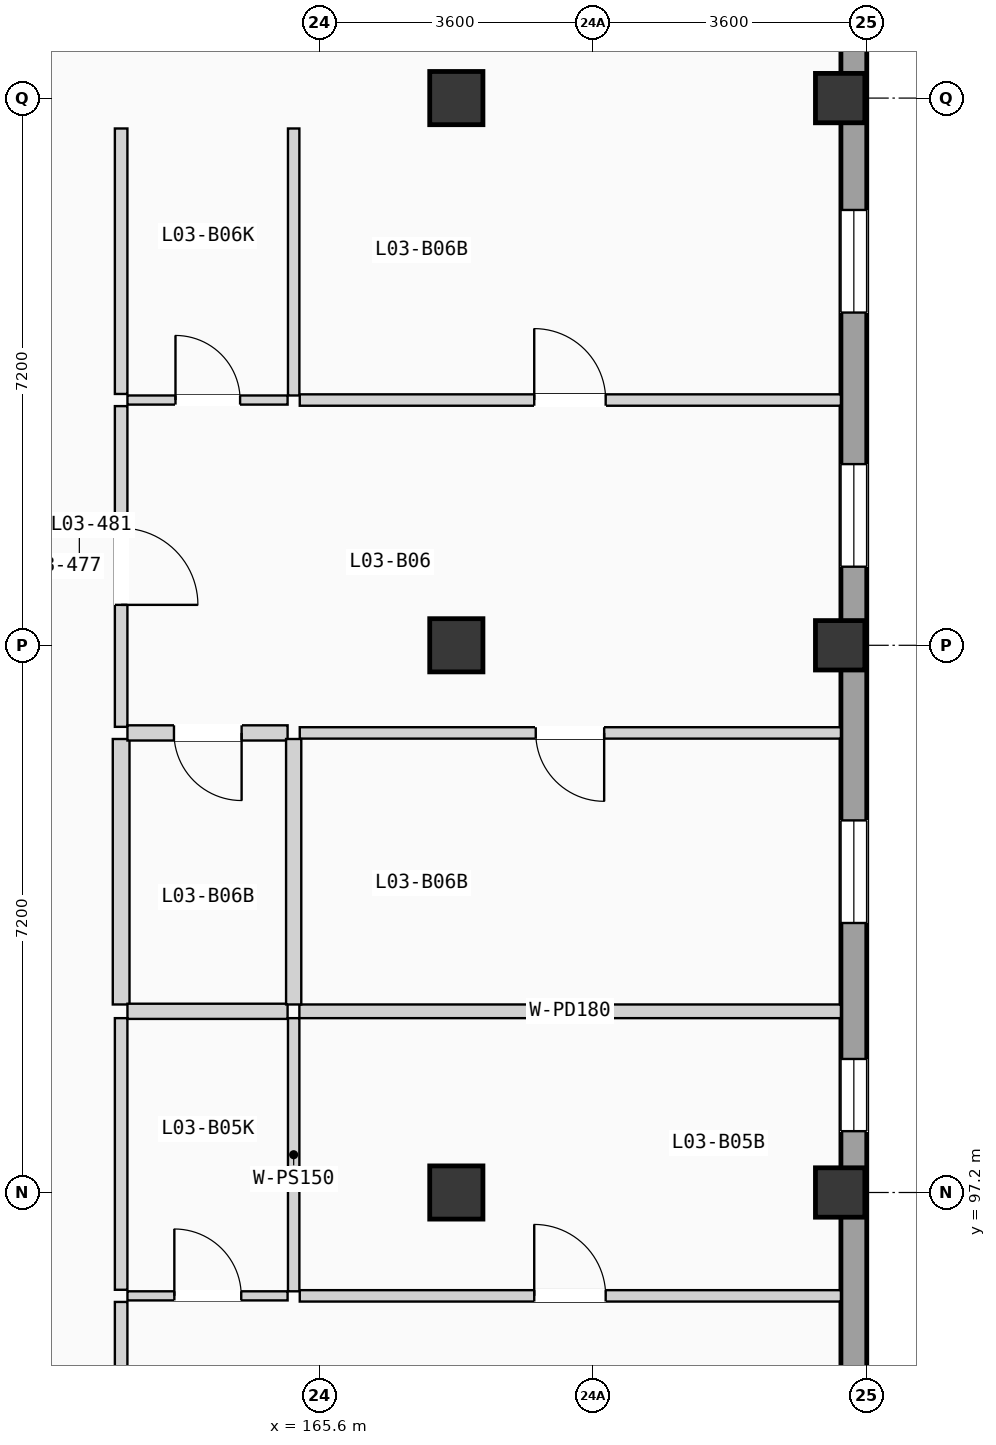
"""IFC4 building model, lengths in metres.
Left out: names, types, materials, properties, quantities, classifications, styles, units other than length and angle.
Written with IfcOpenShell. Run it as: python <this file> out.ifc"""

import sys

from ifc_helpers import new_model, si_unit, direction, frame, frame_2d, origin, origin_2d, place, context, subcontext, project, spatial, rectangle, extrude, element, fill, save


model = new_model("IFC4")
c1 = context("Model", 3, precision=1e-05, world=origin(), true_north=direction((0.0, 1.0)))
c2 = subcontext(c1, "Body", "Model", "MODEL_VIEW")
j1 = project(units=[si_unit("LENGTHUNIT", "METRE"), si_unit("PLANEANGLEUNIT", "RADIAN")], contexts=[c1])
p1 = place(None, origin())
s1 = spatial("IfcSite", under=j1, at=p1, CompositionType="ELEMENT")
p2 = place(p1, origin())
s2 = spatial("IfcBuilding", under=s1, at=p2, CompositionType="ELEMENT")
p3 = place(p2, frame((0.0, 0.0, 12.075)))
s3 = spatial("IfcBuildingStorey", under=s2, at=p3, CompositionType="ELEMENT", Elevation=12.075)
for number, where, z_axis, x_axis in (
    (1, (167.4, 97.2, 0.0), (0.0, 0.0, 1.0), (1.0, 0.0, 0.0)),
    (2, (167.4, 104.4, 0.0), (0.0, 0.0, 1.0), (1.0, 0.0, 0.0)),
    (3, (167.4, 111.6, 0.0), (0.0, 0.0, 1.0), (1.0, 0.0, 0.0)),
):
    element("IfcColumn", number, at=place(p3, frame(where, z_axis=z_axis, x_axis=x_axis)), inside=s3, PredefinedType="COLUMN", context=c2, shape_type="SweptSolid", body=[
        extrude(rectangle(XDim=0.7, YDim=0.7, at=origin_2d()), origin(), (0.0, 0.0, 1.0), 3.15),
    ])
for number, where, z_axis, x_axis in (
    (4, (172.45, 97.2, 0.0), (0.0, 0.0, 1.0), (1.0, 0.0, 0.0)),
    (5, (172.45, 104.4, 0.0), (0.0, 0.0, 1.0), (1.0, 0.0, 0.0)),
    (6, (172.45, 111.6, 0.0), (0.0, 0.0, 1.0), (1.0, 0.0, 0.0)),
):
    element("IfcColumn", number, at=place(p3, frame(where, z_axis=z_axis, x_axis=x_axis)), inside=s3, PredefinedType="COLUMN", context=c2, shape_type="SweptSolid", body=[
        extrude(rectangle(XDim=0.65, YDim=0.65, at=origin_2d()), origin(), (0.0, 0.0, 1.0), 3.15),
    ])
p4 = place(p3, frame((172.63, 68.74, 0.0), z_axis=(0.0, 0.0, 1.0), x_axis=(0.0, 1.0, 0.0)))
e7 = element("IfcWall", 7, at=p4, inside=s3, PredefinedType="SOLIDWALL", context=c2, shape_type="SweptSolid", body=[
    extrude(rectangle(XDim=49.72, YDim=0.34, at=frame_2d((24.86, 0.0))), origin(), (0.0, 0.0, 1.0), 2.89),
])
p5 = place(p4, frame((9.472, 0.0, 0.9)))
e8 = element("IfcOpeningElement", 8, at=p5, cuts=e7, PredefinedType="OPENING", context=c2, shape_type="SweptSolid", body=[
    extrude(rectangle(XDim=1.25, YDim=1.2, at=frame_2d((0.625, 0.6))), frame((0.0, 0.18, 0.0), z_axis=(0.0, -1.0, 0.0), x_axis=(1.0, 0.0, 0.0)), (0.0, 0.0, 1.0), 0.36),
])
p6 = place(p4, frame((15.933, 0.0, 0.855)))
e9 = element("IfcOpeningElement", 9, at=p6, cuts=e7, PredefinedType="OPENING", context=c2, shape_type="SweptSolid", body=[
    extrude(rectangle(XDim=1.25, YDim=1.35, at=frame_2d((0.625, 0.675))), frame((0.0, 0.18, 0.0), z_axis=(0.0, -1.0, 0.0), x_axis=(1.0, 0.0, 0.0)), (0.0, 0.0, 1.0), 0.36),
])
p7 = place(p4, frame((24.235, 0.0, 0.705)))
e10 = element("IfcOpeningElement", 10, at=p7, cuts=e7, PredefinedType="OPENING", context=c2, shape_type="SweptSolid", body=[
    extrude(rectangle(XDim=1.25, YDim=1.5, at=frame_2d((0.625, 0.75))), frame((0.0, 0.18, 0.0), z_axis=(0.0, -1.0, 0.0), x_axis=(1.0, 0.0, 0.0)), (0.0, 0.0, 1.0), 0.36),
])
p8 = place(p4, frame((19.353, 0.0, 0.555)))
e11 = element("IfcOpeningElement", 11, at=p8, cuts=e7, PredefinedType="OPENING", context=c2, shape_type="SweptSolid", body=[
    extrude(rectangle(XDim=1.25, YDim=1.65, at=frame_2d((0.625, 0.825))), frame((0.0, 0.18, 0.0), z_axis=(0.0, -1.0, 0.0), x_axis=(1.0, 0.0, 0.0)), (0.0, 0.0, 1.0), 0.36),
])
p9 = place(p4, frame((29.267, 0.0, 0.85)))
e12 = element("IfcOpeningElement", 12, at=p9, cuts=e7, PredefinedType="OPENING", context=c2, shape_type="SweptSolid", body=[
    extrude(rectangle(XDim=0.95, YDim=1.2, at=frame_2d((0.475, 0.6))), frame((0.0, 0.18, 0.0), z_axis=(0.0, -1.0, 0.0), x_axis=(1.0, 0.0, 0.0)), (0.0, 0.0, 1.0), 0.36),
])
p10 = place(p4, frame((36.694, 0.0, 0.9)))
e13 = element("IfcOpeningElement", 13, at=p10, cuts=e7, PredefinedType="OPENING", context=c2, shape_type="SweptSolid", body=[
    extrude(rectangle(XDim=1.35, YDim=1.2, at=frame_2d((0.675, 0.6))), frame((0.0, 0.18, 0.0), z_axis=(0.0, -1.0, 0.0), x_axis=(1.0, 0.0, 0.0)), (0.0, 0.0, 1.0), 0.36),
])
p11 = place(p4, frame((32.006, 0.0, 0.855)))
e14 = element("IfcOpeningElement", 14, at=p11, cuts=e7, PredefinedType="OPENING", context=c2, shape_type="SweptSolid", body=[
    extrude(rectangle(XDim=1.35, YDim=1.35, at=frame_2d((0.675, 0.675))), frame((0.0, 0.18, 0.0), z_axis=(0.0, -1.0, 0.0), x_axis=(1.0, 0.0, 0.0)), (0.0, 0.0, 1.0), 0.36),
])
p12 = place(p4, frame((40.038, 0.0, 0.705)))
e15 = element("IfcOpeningElement", 15, at=p12, cuts=e7, PredefinedType="OPENING", context=c2, shape_type="SweptSolid", body=[
    extrude(rectangle(XDim=1.35, YDim=1.5, at=frame_2d((0.675, 0.75))), frame((0.0, 0.18, 0.0), z_axis=(0.0, -1.0, 0.0), x_axis=(1.0, 0.0, 0.0)), (0.0, 0.0, 1.0), 0.36),
])
p13 = place(p3, frame((162.99, 91.44, 0.0), z_axis=(0.0, 0.0, 1.0), x_axis=(0.0, 1.0, 0.0)))
e16 = element("IfcWall", 16, at=p13, inside=s3, PredefinedType="PARTITIONING", context=c2, shape_type="SweptSolid", body=[
    extrude(rectangle(XDim=4.32, YDim=0.165, at=frame_2d((2.16, 0.0))), origin(), (0.0, 0.0, 1.0), 2.87),
])
p14 = place(p13, frame((1.655, 0.0, 0.0)))
e17 = element("IfcOpeningElement", 17, at=p14, cuts=e16, PredefinedType="OPENING", context=c2, shape_type="SweptSolid", body=[
    extrude(rectangle(XDim=1.01, YDim=2.11, at=frame_2d((0.505, 1.055))), frame((0.0, 0.093, 0.0), z_axis=(0.0, -1.0, 0.0), x_axis=(1.0, 0.0, 0.0)), (0.0, 0.0, 1.0), 0.185),
])
p15 = place(p3, frame((162.99, 95.92, 0.0), z_axis=(0.0, 0.0, 1.0), x_axis=(0.0, 1.0, 0.0)))
e18 = element("IfcWall", 18, at=p15, inside=s3, PredefinedType="PARTITIONING", context=c2, shape_type="SweptSolid", body=[
    extrude(rectangle(XDim=3.574, YDim=0.165, at=frame_2d((1.787, 0.0))), origin(), (0.0, 0.0, 1.0), 2.87),
])
p16 = place(p3, frame((162.99, 103.327, 0.0), z_axis=(0.0, 0.0, 1.0), x_axis=(0.0, 1.0, 0.0)))
e19 = element("IfcWall", 19, at=p16, inside=s3, PredefinedType="PARTITIONING", context=c2, shape_type="SweptSolid", body=[
    extrude(rectangle(XDim=4.22, YDim=0.165, at=frame_2d((2.11, 0.0))), origin(), (0.0, 0.0, 1.0), 2.87),
])
p17 = place(p16, frame((1.605, 0.0, 0.0)))
e20 = element("IfcOpeningElement", 20, at=p17, cuts=e19, PredefinedType="OPENING", context=c2, shape_type="SweptSolid", body=[
    extrude(rectangle(XDim=1.01, YDim=2.11, at=frame_2d((0.505, 1.055))), frame((0.0, 0.093, 0.0), z_axis=(0.0, -1.0, 0.0), x_axis=(1.0, 0.0, 0.0)), (0.0, 0.0, 1.0), 0.185),
])
p18 = place(p3, frame((162.99, 99.674, 0.0), z_axis=(0.0, 0.0, 1.0), x_axis=(0.0, 1.0, 0.0)))
e21 = element("IfcWall", 21, at=p18, inside=s3, PredefinedType="PLUMBINGWALL", context=c2, shape_type="SweptSolid", body=[
    extrude(rectangle(XDim=3.493, YDim=0.22, at=frame_2d((1.747, 0.0))), origin(), (0.0, 0.0, 1.0), 2.87),
])
p19 = place(p3, frame((162.99, 107.707, 0.0), z_axis=(0.0, 0.0, 1.0), x_axis=(0.0, 1.0, 0.0)))
e22 = element("IfcWall", 22, at=p19, inside=s3, PredefinedType="PARTITIONING", context=c2, shape_type="SweptSolid", body=[
    extrude(rectangle(XDim=3.493, YDim=0.165, at=frame_2d((1.747, 0.0))), origin(), (0.0, 0.0, 1.0), 2.87),
])
p20 = place(p3, frame((163.073, 95.84, 0.0), z_axis=(0.0, 0.0, 1.0), x_axis=(1.0, 0.0, 0.0)))
e23 = element("IfcWall", 23, at=p20, inside=s3, PredefinedType="PARTITIONING", context=c2, shape_type="SweptSolid", body=[
    extrude(rectangle(XDim=2.107, YDim=0.12, at=frame_2d((1.053, 0.0))), origin(), (0.0, 0.0, 1.0), 2.87),
])
p21 = place(p20, frame((0.617, 0.0, 0.0)))
e24 = element("IfcOpeningElement", 24, at=p21, cuts=e23, PredefinedType="OPENING", context=c2, shape_type="SweptSolid", body=[
    extrude(rectangle(XDim=0.88, YDim=2.02, at=frame_2d((0.44, 1.01))), frame((0.0, 0.07, 0.0), z_axis=(0.0, -1.0, 0.0), x_axis=(1.0, 0.0, 0.0)), (0.0, 0.0, 1.0), 0.14),
])
p22 = place(p3, frame((165.34, 95.84, 0.0), z_axis=(0.0, 0.0, 1.0), x_axis=(1.0, 0.0, 0.0)))
e25 = element("IfcWall", 25, at=p22, inside=s3, PredefinedType="PARTITIONING", context=c2, shape_type="SweptSolid", body=[
    extrude(rectangle(XDim=7.12, YDim=0.15, at=frame_2d((3.56, 0.0))), origin(), (0.0, 0.0, 1.0), 2.87),
])
p23 = place(p22, frame((3.085, 0.0, 0.0)))
e26 = element("IfcOpeningElement", 26, at=p23, cuts=e25, PredefinedType="OPENING", context=c2, shape_type="SweptSolid", body=[
    extrude(rectangle(XDim=0.94, YDim=2.06, at=frame_2d((0.47, 1.03))), frame((0.0, 0.085, 0.0), z_axis=(0.0, -1.0, 0.0), x_axis=(1.0, 0.0, 0.0)), (0.0, 0.0, 1.0), 0.17),
])
p24 = place(p3, frame((165.26, 95.9, 0.0), z_axis=(0.0, 0.0, 1.0), x_axis=(0.0, 1.0, 0.0)))
e27 = element("IfcWall", 27, at=p24, inside=s3, PredefinedType="PARTITIONING", context=c2, shape_type="SweptSolid", body=[
    extrude(rectangle(XDim=3.594, YDim=0.15, at=frame_2d((1.797, 0.0))), origin(), (0.0, 0.0, 1.0), 2.87),
])
p25 = place(p3, frame((163.073, 99.584, 0.0), z_axis=(0.0, 0.0, 1.0), x_axis=(1.0, 0.0, 0.0)))
e28 = element("IfcWall", 28, at=p25, inside=s3, PredefinedType="PLUMBINGWALL", context=c2, shape_type="SweptSolid", body=[
    extrude(rectangle(XDim=2.107, YDim=0.2, at=frame_2d((1.053, 0.0))), origin(), (0.0, 0.0, 1.0), 2.87),
])
p26 = place(p3, frame((165.335, 99.584, 0.0), z_axis=(0.0, 0.0, 1.0), x_axis=(1.0, 0.0, 0.0)))
e29 = element("IfcWall", 29, at=p26, inside=s3, PredefinedType="PARTITIONING", context=c2, shape_type="SweptSolid", body=[
    extrude(rectangle(XDim=7.125, YDim=0.18, at=frame_2d((3.562, 0.0))), origin(), (0.0, 0.0, 1.0), 2.87),
])
p27 = place(p3, frame((163.073, 103.247, 0.0), z_axis=(0.0, 0.0, 1.0), x_axis=(1.0, 0.0, 0.0)))
e30 = element("IfcWall", 30, at=p27, inside=s3, PredefinedType="PLUMBINGWALL", context=c2, shape_type="SweptSolid", body=[
    extrude(rectangle(XDim=2.107, YDim=0.2, at=frame_2d((1.053, 0.0))), origin(), (0.0, 0.0, 1.0), 2.87),
])
p28 = place(p27, frame((0.612, 0.0, 0.0)))
e31 = element("IfcOpeningElement", 31, at=p28, cuts=e30, PredefinedType="OPENING", context=c2, shape_type="SweptSolid", body=[
    extrude(rectangle(XDim=0.89, YDim=2.03, at=frame_2d((0.445, 1.015))), frame((0.0, 0.11, 0.0), z_axis=(0.0, -1.0, 0.0), x_axis=(1.0, 0.0, 0.0)), (0.0, 0.0, 1.0), 0.22),
])
p29 = place(p3, frame((163.073, 107.627, 0.0), z_axis=(0.0, 0.0, 1.0), x_axis=(1.0, 0.0, 0.0)))
e32 = element("IfcWall", 32, at=p29, inside=s3, PredefinedType="PARTITIONING", context=c2, shape_type="SweptSolid", body=[
    extrude(rectangle(XDim=2.107, YDim=0.12, at=frame_2d((1.053, 0.0))), origin(), (0.0, 0.0, 1.0), 2.87),
])
p30 = place(p29, frame((0.632, 0.0, 0.0)))
e33 = element("IfcOpeningElement", 33, at=p30, cuts=e32, PredefinedType="OPENING", context=c2, shape_type="SweptSolid", body=[
    extrude(rectangle(XDim=0.85, YDim=2.01, at=frame_2d((0.425, 1.005))), frame((0.0, 0.07, 0.0), z_axis=(0.0, -1.0, 0.0), x_axis=(1.0, 0.0, 0.0)), (0.0, 0.0, 1.0), 0.14),
])
p31 = place(p3, frame((165.34, 103.247, 0.0), z_axis=(0.0, 0.0, 1.0), x_axis=(1.0, 0.0, 0.0)))
e34 = element("IfcWall", 34, at=p31, inside=s3, PredefinedType="PARTITIONING", context=c2, shape_type="SweptSolid", body=[
    extrude(rectangle(XDim=7.12, YDim=0.15, at=frame_2d((3.56, 0.0))), origin(), (0.0, 0.0, 1.0), 2.87),
])
p32 = place(p31, frame((3.105, 0.0, 0.0)))
e35 = element("IfcOpeningElement", 35, at=p32, cuts=e34, PredefinedType="OPENING", context=c2, shape_type="SweptSolid", body=[
    extrude(rectangle(XDim=0.9, YDim=2.04, at=frame_2d((0.45, 1.02))), frame((0.0, 0.085, 0.0), z_axis=(0.0, -1.0, 0.0), x_axis=(1.0, 0.0, 0.0)), (0.0, 0.0, 1.0), 0.17),
])
p33 = place(p3, frame((165.34, 107.627, 0.0), z_axis=(0.0, 0.0, 1.0), x_axis=(1.0, 0.0, 0.0)))
e36 = element("IfcWall", 36, at=p33, inside=s3, PredefinedType="PARTITIONING", context=c2, shape_type="SweptSolid", body=[
    extrude(rectangle(XDim=7.12, YDim=0.15, at=frame_2d((3.56, 0.0))), origin(), (0.0, 0.0, 1.0), 2.87),
])
p34 = place(p33, frame((3.085, 0.0, 0.0)))
e37 = element("IfcOpeningElement", 37, at=p34, cuts=e36, PredefinedType="OPENING", context=c2, shape_type="SweptSolid", body=[
    extrude(rectangle(XDim=0.94, YDim=2.06, at=frame_2d((0.47, 1.03))), frame((0.0, 0.085, 0.0), z_axis=(0.0, -1.0, 0.0), x_axis=(1.0, 0.0, 0.0)), (0.0, 0.0, 1.0), 0.17),
])
p35 = place(p3, frame((165.26, 99.674, 0.0), z_axis=(0.0, 0.0, 1.0), x_axis=(0.0, 1.0, 0.0)))
e38 = element("IfcWall", 38, at=p35, inside=s3, PredefinedType="PLUMBINGWALL", context=c2, shape_type="SweptSolid", body=[
    extrude(rectangle(XDim=3.493, YDim=0.2, at=frame_2d((1.747, 0.0))), origin(), (0.0, 0.0, 1.0), 2.87),
])
p36 = place(p3, frame((165.26, 107.687, 0.0), z_axis=(0.0, 0.0, 1.0), x_axis=(0.0, 1.0, 0.0)))
e39 = element("IfcWall", 39, at=p36, inside=s3, PredefinedType="PARTITIONING", context=c2, shape_type="SweptSolid", body=[
    extrude(rectangle(XDim=3.513, YDim=0.15, at=frame_2d((1.756, 0.0))), origin(), (0.0, 0.0, 1.0), 2.87),
])
p37 = place(p9, origin())
e40 = element("IfcWindow", 40, at=p37, inside=s3, PartitioningType="SINGLE_PANEL", PredefinedType="WINDOW", context=c2, shape_type="SweptSolid", body=[
    extrude(rectangle(XDim=0.95, YDim=1.2, at=frame_2d((0.475, 0.6))), frame((0.0, 0.03, 0.0), z_axis=(0.0, -1.0, 0.0), x_axis=(1.0, 0.0, 0.0)), (0.0, 0.0, 1.0), 0.06),
])
fill(e12, e40)
p38 = place(p10, origin())
e41 = element("IfcWindow", 41, at=p38, inside=s3, PartitioningType="SINGLE_PANEL", PredefinedType="WINDOW", context=c2, shape_type="SweptSolid", body=[
    extrude(rectangle(XDim=1.35, YDim=1.2, at=frame_2d((0.675, 0.6))), frame((0.0, 0.03, 0.0), z_axis=(0.0, -1.0, 0.0), x_axis=(1.0, 0.0, 0.0)), (0.0, 0.0, 1.0), 0.06),
])
fill(e13, e41)
p39 = place(p11, origin())
e42 = element("IfcWindow", 42, at=p39, inside=s3, PartitioningType="SINGLE_PANEL", PredefinedType="WINDOW", context=c2, shape_type="SweptSolid", body=[
    extrude(rectangle(XDim=1.35, YDim=1.35, at=frame_2d((0.675, 0.675))), frame((0.0, 0.03, 0.0), z_axis=(0.0, -1.0, 0.0), x_axis=(1.0, 0.0, 0.0)), (0.0, 0.0, 1.0), 0.06),
])
fill(e14, e42)
p40 = place(p12, origin())
e43 = element("IfcWindow", 43, at=p40, inside=s3, PartitioningType="SINGLE_PANEL", PredefinedType="WINDOW", context=c2, shape_type="SweptSolid", body=[
    extrude(rectangle(XDim=1.35, YDim=1.5, at=frame_2d((0.675, 0.75))), frame((0.0, 0.03, 0.0), z_axis=(0.0, -1.0, 0.0), x_axis=(1.0, 0.0, 0.0)), (0.0, 0.0, 1.0), 0.06),
])
fill(e15, e43)
p41 = place(p17, frame((1.01, 0.0, 0.0), z_axis=(0.0, 0.0, 1.0), x_axis=(-1.0, 0.0, 0.0)))
e44 = element("IfcDoor", 44, at=p41, inside=s3, OperationType="SINGLE_SWING_LEFT", PredefinedType="DOOR", context=c2, shape_type="SweptSolid", body=[
    extrude(rectangle(XDim=1.01, YDim=2.11, at=frame_2d((0.505, 1.055))), frame((0.0, 0.025, 0.0), z_axis=(0.0, -1.0, 0.0), x_axis=(1.0, 0.0, 0.0)), (0.0, 0.0, 1.0), 0.05),
])
fill(e20, e44)
p42 = place(p21, origin())
e45 = element("IfcDoor", 45, at=p42, inside=s3, OperationType="SINGLE_SWING_LEFT", PredefinedType="DOOR", context=c2, shape_type="SweptSolid", body=[
    extrude(rectangle(XDim=0.88, YDim=2.02, at=frame_2d((0.44, 1.01))), frame((0.0, 0.025, 0.0), z_axis=(0.0, -1.0, 0.0), x_axis=(1.0, 0.0, 0.0)), (0.0, 0.0, 1.0), 0.05),
])
fill(e24, e45)
p43 = place(p23, origin())
e46 = element("IfcDoor", 46, at=p43, inside=s3, OperationType="SINGLE_SWING_LEFT", PredefinedType="DOOR", context=c2, shape_type="SweptSolid", body=[
    extrude(rectangle(XDim=0.94, YDim=2.06, at=frame_2d((0.47, 1.03))), frame((0.0, 0.025, 0.0), z_axis=(0.0, -1.0, 0.0), x_axis=(1.0, 0.0, 0.0)), (0.0, 0.0, 1.0), 0.05),
])
fill(e26, e46)
p44 = place(p28, frame((0.89, 0.0, 0.0), z_axis=(0.0, 0.0, 1.0), x_axis=(-1.0, 0.0, 0.0)))
e47 = element("IfcDoor", 47, at=p44, inside=s3, OperationType="SINGLE_SWING_RIGHT", PredefinedType="DOOR", context=c2, shape_type="SweptSolid", body=[
    extrude(rectangle(XDim=0.89, YDim=2.03, at=frame_2d((0.445, 1.015))), frame((0.0, 0.025, 0.0), z_axis=(0.0, -1.0, 0.0), x_axis=(1.0, 0.0, 0.0)), (0.0, 0.0, 1.0), 0.05),
])
fill(e31, e47)
p45 = place(p30, origin())
e48 = element("IfcDoor", 48, at=p45, inside=s3, OperationType="SINGLE_SWING_LEFT", PredefinedType="DOOR", context=c2, shape_type="SweptSolid", body=[
    extrude(rectangle(XDim=0.85, YDim=2.01, at=frame_2d((0.425, 1.005))), frame((0.0, 0.025, 0.0), z_axis=(0.0, -1.0, 0.0), x_axis=(1.0, 0.0, 0.0)), (0.0, 0.0, 1.0), 0.05),
])
fill(e33, e48)
p46 = place(p32, frame((0.9, 0.0, 0.0), z_axis=(0.0, 0.0, 1.0), x_axis=(-1.0, 0.0, 0.0)))
e49 = element("IfcDoor", 49, at=p46, inside=s3, OperationType="SINGLE_SWING_RIGHT", PredefinedType="DOOR", context=c2, shape_type="SweptSolid", body=[
    extrude(rectangle(XDim=0.9, YDim=2.04, at=frame_2d((0.45, 1.02))), frame((0.0, 0.025, 0.0), z_axis=(0.0, -1.0, 0.0), x_axis=(1.0, 0.0, 0.0)), (0.0, 0.0, 1.0), 0.05),
])
fill(e35, e49)
p47 = place(p34, origin())
e50 = element("IfcDoor", 50, at=p47, inside=s3, OperationType="SINGLE_SWING_LEFT", PredefinedType="DOOR", context=c2, shape_type="SweptSolid", body=[
    extrude(rectangle(XDim=0.94, YDim=2.06, at=frame_2d((0.47, 1.03))), frame((0.0, 0.025, 0.0), z_axis=(0.0, -1.0, 0.0), x_axis=(1.0, 0.0, 0.0)), (0.0, 0.0, 1.0), 0.05),
])
fill(e37, e50)
save(model, sys.argv[1])
